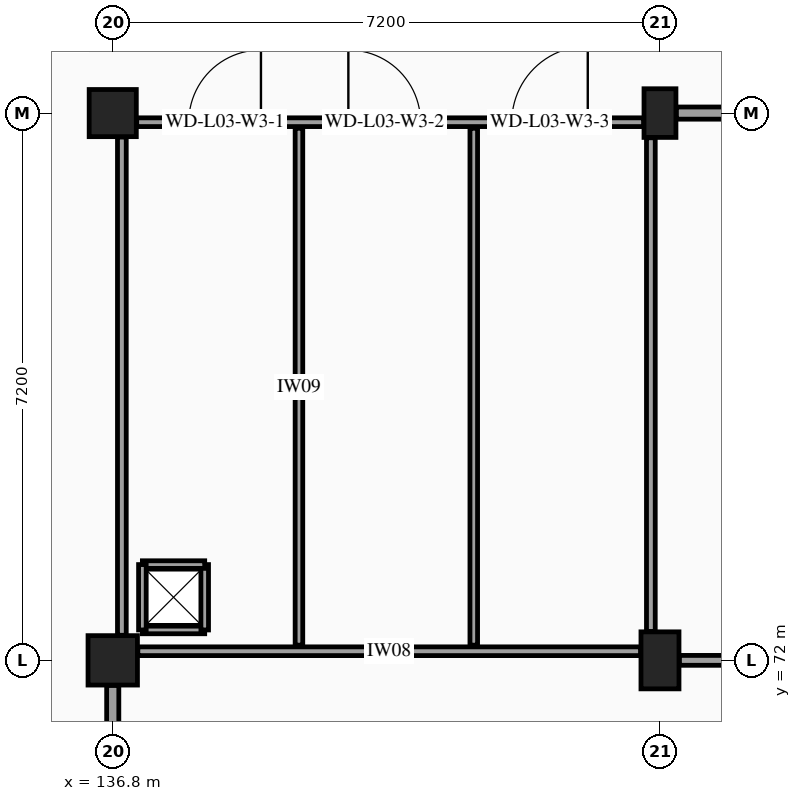
"""IFC4 building model, lengths in metres.
Left out: names, types, materials, properties, quantities, classifications, styles, units other than length and angle.
Written with IfcOpenShell. Run it as: python <this file> out.ifc"""

import sys

from ifc_helpers import new_model, si_unit, direction, frame, frame_2d, origin, origin_2d, place, context, subcontext, project, spatial, rectangle, extrude, element, fill, save


model = new_model("IFC4")
c1 = context("Model", 3, precision=1e-05, world=origin(), true_north=direction((0.0, 1.0)))
c2 = subcontext(c1, "Body", "Model", "MODEL_VIEW")
j1 = project(units=[si_unit("LENGTHUNIT", "METRE"), si_unit("PLANEANGLEUNIT", "RADIAN")], contexts=[c1])
p1 = place(None, origin())
s1 = spatial("IfcSite", under=j1, at=p1, CompositionType="ELEMENT")
p2 = place(p1, origin())
s2 = spatial("IfcBuilding", under=s1, at=p2, CompositionType="ELEMENT")
p3 = place(p2, frame((0.0, 0.0, 14.4)))
s3 = spatial("IfcBuildingStorey", under=s2, at=p3, CompositionType="ELEMENT", Elevation=14.4)
p4 = place(p3, frame((136.8, 72.0, 0.0), z_axis=(0.0, 0.0, 1.0), x_axis=(1.0, 0.0, 0.0)))
e1 = element("IfcColumn", 1, at=p4, inside=s3, PredefinedType="COLUMN", context=c2, shape_type="SweptSolid", body=[
    extrude(rectangle(XDim=0.65, YDim=0.65, at=origin_2d()), origin(), (0.0, 0.0, 1.0), 4.2),
])
p5 = place(p3, frame((136.8, 79.2, 0.0), z_axis=(0.0, 0.0, 1.0), x_axis=(1.0, 0.0, 0.0)))
e2 = element("IfcColumn", 2, at=p5, inside=s3, PredefinedType="COLUMN", context=c2, shape_type="SweptSolid", body=[
    extrude(rectangle(XDim=0.62, YDim=0.62, at=origin_2d()), origin(), (0.0, 0.0, 1.0), 4.2),
])
p6 = place(p3, frame((144.0, 72.0, 0.0), z_axis=(0.0, 0.0, 1.0), x_axis=(1.0, 0.0, 0.0)))
e3 = element("IfcColumn", 3, at=p6, inside=s3, PredefinedType="COLUMN", context=c2, shape_type="SweptSolid", body=[
    extrude(rectangle(XDim=0.5, YDim=0.75, at=origin_2d()), origin(), (0.0, 0.0, 1.0), 4.2),
])
p7 = place(p3, frame((144.0, 79.2, 0.0), z_axis=(0.0, 0.0, 1.0), x_axis=(1.0, 0.0, 0.0)))
e4 = element("IfcColumn", 4, at=p7, inside=s3, PredefinedType="PILASTER", context=c2, shape_type="SweptSolid", body=[
    extrude(rectangle(XDim=0.42, YDim=0.64, at=origin_2d()), origin(), (0.0, 0.0, 1.0), 4.2),
])
p8 = place(p3, frame((137.13, 72.12, 0.0), z_axis=(0.0, 0.0, 1.0), x_axis=(1.0, 0.0, 0.0)))
e5 = element("IfcWall", 5, at=p8, inside=s3, PredefinedType="PARTITIONING", context=c2, shape_type="SweptSolid", body=[
    extrude(rectangle(XDim=6.615, YDim=0.115, at=frame_2d((3.308, 0.0))), origin(), (0.0, 0.0, 1.0), 3.175),
])
p9 = place(p3, frame((137.115, 79.08, 0.0), z_axis=(0.0, 0.0, 1.0), x_axis=(1.0, 0.0, 0.0)))
e6 = element("IfcWall", 6, at=p9, inside=s3, PredefinedType="PARTITIONING", context=c2, shape_type="SweptSolid", body=[
    extrude(rectangle(XDim=6.67, YDim=0.115, at=frame_2d((3.335, 0.0))), origin(), (0.0, 0.0, 1.0), 3.2),
])
p10 = place(p9, frame((0.685, 0.0, 0.0)))
e7 = element("IfcOpeningElement", 7, at=p10, cuts=e6, PredefinedType="OPENING", context=c2, shape_type="SweptSolid", body=[
    extrude(rectangle(XDim=0.95, YDim=2.1, at=frame_2d((0.475, 1.05))), frame((0.0, 0.067, 0.0), z_axis=(0.0, -1.0, 0.0), x_axis=(1.0, 0.0, 0.0)), (0.0, 0.0, 1.0), 0.135),
])
p11 = place(p9, frame((2.785, 0.0, 0.0)))
e8 = element("IfcOpeningElement", 8, at=p11, cuts=e6, PredefinedType="OPENING", context=c2, shape_type="SweptSolid", body=[
    extrude(rectangle(XDim=0.95, YDim=2.1, at=frame_2d((0.475, 1.05))), frame((0.0, 0.067, 0.0), z_axis=(0.0, -1.0, 0.0), x_axis=(1.0, 0.0, 0.0)), (0.0, 0.0, 1.0), 0.135),
])
p12 = place(p9, frame((4.935, 0.0, 0.0)))
e9 = element("IfcOpeningElement", 9, at=p12, cuts=e6, PredefinedType="OPENING", context=c2, shape_type="SweptSolid", body=[
    extrude(rectangle(XDim=1.0, YDim=2.15, at=frame_2d((0.5, 1.075))), frame((0.0, 0.067, 0.0), z_axis=(0.0, -1.0, 0.0), x_axis=(1.0, 0.0, 0.0)), (0.0, 0.0, 1.0), 0.135),
])
p13 = place(p3, frame((136.92, 72.33, 0.0), z_axis=(0.0, 0.0, 1.0), x_axis=(0.0, 1.0, 0.0)))
e10 = element("IfcWall", 10, at=p13, inside=s3, PredefinedType="PARTITIONING", context=c2, shape_type="SweptSolid", body=[
    extrude(rectangle(XDim=6.555, YDim=0.115, at=frame_2d((3.277, 0.0))), origin(), (0.0, 0.0, 1.0), 3.285),
])
p14 = place(p3, frame((143.88, 72.38, 0.0), z_axis=(0.0, 0.0, 1.0), x_axis=(0.0, 1.0, 0.0)))
e11 = element("IfcWall", 11, at=p14, inside=s3, PredefinedType="PARTITIONING", context=c2, shape_type="SweptSolid", body=[
    extrude(rectangle(XDim=6.495, YDim=0.115, at=frame_2d((3.248, 0.0))), origin(), (0.0, 0.0, 1.0), 3.31),
])
for number, where, z_axis, x_axis in (
    (12, (139.25, 72.2, 0.0), (0.0, 0.0, 1.0), (0.0, 1.0, 0.0)),
    (13, (141.55, 72.2, 0.0), (0.0, 0.0, 1.0), (0.0, 1.0, 0.0)),
):
    element("IfcWall", number, at=place(p3, frame(where, z_axis=z_axis, x_axis=x_axis)), inside=s3, PredefinedType="PARTITIONING", context=c2, shape_type="SweptSolid", body=[
        extrude(rectangle(XDim=6.8, YDim=0.1, at=frame_2d((3.4, 0.0))), origin(), (0.0, 0.0, 1.0), 3.94),
    ])
p15 = place(p3, frame((137.19, 72.4, 0.0), z_axis=(0.0, 0.0, 1.0), x_axis=(1.0, 0.0, 0.0)))
e14 = element("IfcWall", 14, at=p15, inside=s3, PredefinedType="PARTITIONING", context=c2, shape_type="SweptSolid", body=[
    extrude(rectangle(XDim=0.82, YDim=0.1, at=frame_2d((0.41, 0.0))), origin(), (0.0, 0.0, 1.0), 3.94),
])
p16 = place(p3, frame((138.01, 72.4, 0.0), z_axis=(0.0, 0.0, 1.0), x_axis=(0.0, 1.0, 0.0)))
e15 = element("IfcWall", 15, at=p16, inside=s3, PredefinedType="PARTITIONING", context=c2, shape_type="SweptSolid", body=[
    extrude(rectangle(XDim=0.86, YDim=0.1, at=frame_2d((0.43, 0.0))), origin(), (0.0, 0.0, 1.0), 3.94),
])
p17 = place(p3, frame((138.01, 73.26, 0.0), z_axis=(0.0, 0.0, 1.0), x_axis=(-1.0, 0.0, 0.0)))
e16 = element("IfcWall", 16, at=p17, inside=s3, PredefinedType="PARTITIONING", context=c2, shape_type="SweptSolid", body=[
    extrude(rectangle(XDim=0.82, YDim=0.1, at=frame_2d((0.41, 0.0))), origin(), (0.0, 0.0, 1.0), 3.94),
])
p18 = place(p3, frame((137.19, 73.26, 0.0), z_axis=(0.0, 0.0, 1.0), x_axis=(0.0, -1.0, 0.0)))
e17 = element("IfcWall", 17, at=p18, inside=s3, PredefinedType="PARTITIONING", context=c2, shape_type="SweptSolid", body=[
    extrude(rectangle(XDim=0.86, YDim=0.1, at=frame_2d((0.43, 0.0))), origin(), (0.0, 0.0, 1.0), 3.94),
])
p19 = place(p3, frame((136.8, 65.145, 0.0), z_axis=(0.0, 0.0, 1.0), x_axis=(0.0, 1.0, 0.0)))
e18 = element("IfcWall", 18, at=p19, inside=s3, PredefinedType="PARTITIONING", context=c2, shape_type="SweptSolid", body=[
    extrude(rectangle(XDim=6.525, YDim=0.16, at=frame_2d((3.262, 0.0))), origin(), (0.0, 0.0, 1.0), 3.11),
])
p20 = place(p19, frame((2.623, 0.0, 0.0)))
e19 = element("IfcOpeningElement", 19, at=p20, cuts=e18, PredefinedType="OPENING", context=c2, shape_type="SweptSolid", body=[
    extrude(rectangle(XDim=1.28, YDim=2.24, at=frame_2d((0.64, 1.12))), frame((0.0, 0.09, 0.0), z_axis=(0.0, -1.0, 0.0), x_axis=(1.0, 0.0, 0.0)), (0.0, 0.0, 1.0), 0.18),
])
p21 = place(p3, frame((144.255, 72.0, 0.0), z_axis=(0.0, 0.0, 1.0), x_axis=(1.0, 0.0, 0.0)))
e20 = element("IfcWall", 20, at=p21, inside=s3, PredefinedType="PARTITIONING", context=c2, shape_type="SweptSolid", body=[
    extrude(rectangle(XDim=6.615, YDim=0.13, at=frame_2d((3.308, 0.0))), origin(), (0.0, 0.0, 1.0), 3.19),
])
p22 = place(p21, frame((2.833, 0.0, 0.0)))
e21 = element("IfcOpeningElement", 21, at=p22, cuts=e20, PredefinedType="OPENING", context=c2, shape_type="SweptSolid", body=[
    extrude(rectangle(XDim=0.95, YDim=2.15, at=frame_2d((0.475, 1.075))), frame((0.0, 0.075, 0.0), z_axis=(0.0, -1.0, 0.0), x_axis=(1.0, 0.0, 0.0)), (0.0, 0.0, 1.0), 0.15),
])
p23 = place(p3, frame((144.215, 79.2, 0.0), z_axis=(0.0, 0.0, 1.0), x_axis=(1.0, 0.0, 0.0)))
e22 = element("IfcWall", 22, at=p23, inside=s3, PredefinedType="PARTITIONING", context=c2, shape_type="SweptSolid", body=[
    extrude(rectangle(XDim=6.67, YDim=0.16, at=frame_2d((3.335, 0.0))), origin(), (0.0, 0.0, 1.0), 3.215),
])
p24 = place(p10, origin())
e23 = element("IfcDoor", 23, at=p24, inside=s3, OperationType="SINGLE_SWING_RIGHT", PredefinedType="DOOR", context=c2, shape_type="SweptSolid", body=[
    extrude(rectangle(XDim=0.95, YDim=2.1, at=frame_2d((0.475, 1.05))), frame((0.0, 0.025, 0.0), z_axis=(0.0, -1.0, 0.0), x_axis=(1.0, 0.0, 0.0)), (0.0, 0.0, 1.0), 0.05),
])
fill(e7, e23)
p25 = place(p11, origin())
e24 = element("IfcDoor", 24, at=p25, inside=s3, OperationType="SINGLE_SWING_LEFT", PredefinedType="DOOR", context=c2, shape_type="SweptSolid", body=[
    extrude(rectangle(XDim=0.95, YDim=2.1, at=frame_2d((0.475, 1.05))), frame((0.0, 0.025, 0.0), z_axis=(0.0, -1.0, 0.0), x_axis=(1.0, 0.0, 0.0)), (0.0, 0.0, 1.0), 0.05),
])
fill(e8, e24)
p26 = place(p12, origin())
e25 = element("IfcDoor", 25, at=p26, inside=s3, OperationType="SINGLE_SWING_RIGHT", PredefinedType="DOOR", context=c2, shape_type="SweptSolid", body=[
    extrude(rectangle(XDim=1.0, YDim=2.15, at=frame_2d((0.5, 1.075))), frame((0.0, 0.025, 0.0), z_axis=(0.0, -1.0, 0.0), x_axis=(1.0, 0.0, 0.0)), (0.0, 0.0, 1.0), 0.05),
])
fill(e9, e25)
save(model, sys.argv[1])
